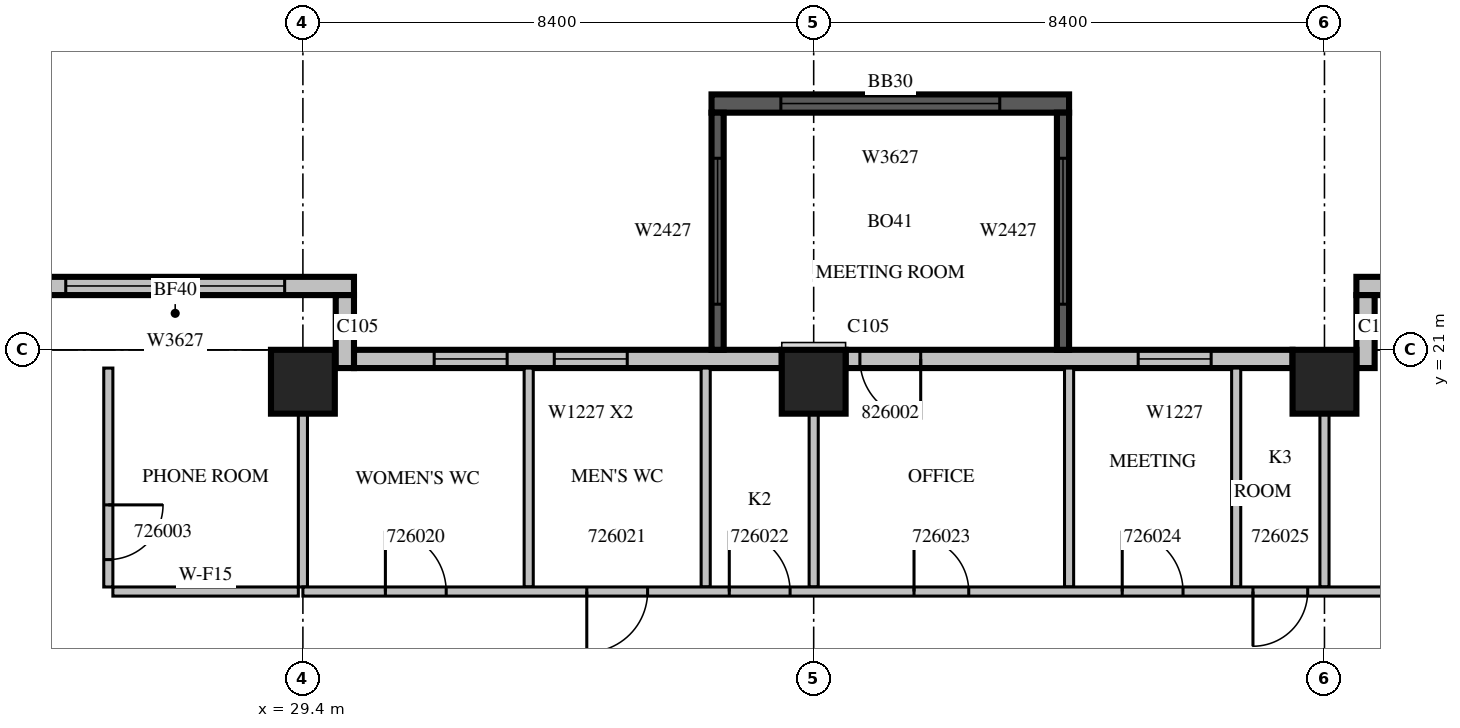
"""IFC4 building model, lengths in metres.
Left out: names, types, materials, properties, quantities, classifications, styles, units other than length and angle.
Written with IfcOpenShell. Run it as: python <this file> out.ifc"""

import sys

from ifc_helpers import new_model, si_unit, direction, frame, frame_2d, origin, origin_2d, place, context, subcontext, project, spatial, rectangle, extrude, source, transform, mapped, element, fill, save


model = new_model("IFC4")
c1 = context("Model", 3, precision=1e-05, world=origin(), true_north=direction((0.0, 1.0)))
c2 = subcontext(c1, "Body", "Model", "MODEL_VIEW")
j1 = project(units=[si_unit("LENGTHUNIT", "METRE"), si_unit("PLANEANGLEUNIT", "RADIAN")], contexts=[c1])
p1 = place(None, origin())
s1 = spatial("IfcSite", under=j1, at=p1, CompositionType="ELEMENT")
p2 = place(p1, origin())
s2 = spatial("IfcBuilding", under=s1, at=p2, CompositionType="ELEMENT")
p3 = place(p2, frame((0.0, 0.0, 120.3)))
s3 = spatial("IfcBuildingStorey", under=s2, at=p3, CompositionType="ELEMENT", Elevation=120.3)
m1 = source(origin(), c2, "Body", "SweptSolid", [
    extrude(rectangle(XDim=1.05, YDim=1.05, at=origin_2d()), origin(), (0.0, 0.0, 1.0), 4.2),
])
for number, where, z_axis, x_axis in (
    (1, (29.4, 20.475, 0.0), (0.0, 0.0, 1.0), (1.0, 0.0, 0.0)),
    (2, (37.8, 20.475, 0.0), (0.0, 0.0, 1.0), (1.0, 0.0, 0.0)),
    (3, (46.2, 20.475, 0.0), (0.0, 0.0, 1.0), (1.0, 0.0, 0.0)),
):
    element("IfcColumn", number, at=place(p3, frame(where, z_axis=z_axis, x_axis=x_axis)), inside=s3, PredefinedType="COLUMN", context=c2, shape_type="MappedRepresentation", body=[
        mapped(m1, transform((0.0, 0.0, 0.0), scale=1.0)),
    ])
m2 = source(origin(), c2, "Body", "SweptSolid", [
    extrude(rectangle(XDim=3.675, YDim=0.3, at=frame_2d((1.837, 0.0))), origin(), (0.0, 0.0, 1.0), 3.8),
])
p4 = place(p3, frame((50.4, 22.05, 0.0), z_axis=(0.0, 0.0, 1.0), x_axis=(-1.0, 0.0, 0.0)))
e4 = element("IfcWall", 4, at=p4, inside=s3, PredefinedType="STANDARD", context=c2, shape_type="MappedRepresentation", body=[
    mapped(m2, transform((0.0, 0.0, 0.0), scale=1.0)),
])
m3 = source(origin(), c2, "Body", "SweptSolid", [
    extrude(rectangle(XDim=2.4, YDim=2.7, at=frame_2d((1.2, 1.35))), frame((0.0, 0.16, 0.0), z_axis=(0.0, -1.0, 0.0), x_axis=(1.0, 0.0, 0.0)), (0.0, 0.0, 1.0), 0.32),
])
p5 = place(p4, frame((0.537, 0.0, 0.6)))
e5 = element("IfcOpeningElement", 5, at=p5, cuts=e4, PredefinedType="OPENING", context=c2, shape_type="MappedRepresentation", body=[
    mapped(m3, transform((0.0, 0.0, 0.0), scale=1.0)),
])
m4 = source(origin(), c2, "Body", "SweptSolid", [
    extrude(rectangle(XDim=1.2, YDim=0.3, at=frame_2d((0.6, 0.0))), origin(), (0.0, 0.0, 1.0), 3.8),
])
p6 = place(p3, frame((46.875, 20.7, 0.0), z_axis=(0.0, 0.0, 1.0), x_axis=(0.0, 1.0, 0.0)))
e6 = element("IfcWall", 6, at=p6, inside=s3, PredefinedType="STANDARD", context=c2, shape_type="MappedRepresentation", body=[
    mapped(m4, transform((0.0, 0.0, 0.0), scale=1.0)),
])
m5 = source(origin(), c2, "Body", "SweptSolid", [
    extrude(rectangle(XDim=7.35, YDim=0.3, at=frame_2d((3.675, 0.0))), origin(), (0.0, 0.0, 1.0), 3.8),
])
p7 = place(p3, frame((45.675, 20.85, 0.0), z_axis=(0.0, 0.0, 1.0), x_axis=(-1.0, 0.0, 0.0)))
e7 = element("IfcWall", 7, at=p7, inside=s3, PredefinedType="STANDARD", context=c2, shape_type="MappedRepresentation", body=[
    mapped(m5, transform((0.0, 0.0, 0.0), scale=1.0)),
])
m6 = source(origin(), c2, "Body", "SweptSolid", [
    extrude(rectangle(XDim=1.2, YDim=2.7, at=frame_2d((0.6, 1.35))), frame((0.0, 0.16, 0.0), z_axis=(0.0, -1.0, 0.0), x_axis=(1.0, 0.0, 0.0)), (0.0, 0.0, 1.0), 0.32),
])
p8 = place(p7, frame((1.339, 0.0, 0.6)))
e8 = element("IfcOpeningElement", 8, at=p8, cuts=e7, PredefinedType="OPENING", context=c2, shape_type="MappedRepresentation", body=[
    mapped(m6, transform((0.0, 0.0, 0.0), scale=1.0)),
])
m7 = source(origin(), c2, "Body", "SweptSolid", [
    extrude(rectangle(XDim=1.0, YDim=2.1, at=frame_2d((0.5, 1.05))), frame((0.0, 0.16, 0.0), z_axis=(0.0, -1.0, 0.0), x_axis=(1.0, 0.0, 0.0)), (0.0, 0.0, 1.0), 0.32),
])
p9 = place(p7, frame((6.115, 0.0, 0.0)))
e9 = element("IfcOpeningElement", 9, at=p9, cuts=e7, PredefinedType="OPENING", context=c2, shape_type="MappedRepresentation", body=[
    mapped(m7, transform((0.0, 0.0, 0.0), scale=1.0)),
])
p10 = place(p3, frame((37.275, 20.85, 0.0), z_axis=(0.0, 0.0, 1.0), x_axis=(-1.0, 0.0, 0.0)))
e10 = element("IfcWall", 10, at=p10, inside=s3, PredefinedType="STANDARD", context=c2, shape_type="SweptSolid", body=[
    extrude(rectangle(XDim=7.035, YDim=0.3, at=frame_2d((3.518, 0.0))), origin(), (0.0, 0.0, 1.0), 3.8),
])
p11 = place(p10, frame((2.541, 0.0, 0.6)))
e11 = element("IfcOpeningElement", 11, at=p11, cuts=e10, PredefinedType="OPENING", context=c2, shape_type="MappedRepresentation", body=[
    mapped(m6, transform((0.0, 0.0, 0.0), scale=1.0)),
])
p12 = place(p10, frame((4.516, 0.0, 0.6)))
e12 = element("IfcOpeningElement", 12, at=p12, cuts=e10, PredefinedType="OPENING", context=c2, shape_type="MappedRepresentation", body=[
    mapped(m6, transform((0.0, 0.0, 0.0), scale=1.0)),
])
m8 = source(origin(), c2, "Body", "SweptSolid", [
    extrude(rectangle(XDim=5.88, YDim=0.3, at=frame_2d((2.94, 0.0))), origin(), (0.0, 0.0, 1.0), 3.8),
])
p13 = place(p3, frame((30.24, 22.05, 0.0), z_axis=(0.0, 0.0, 1.0), x_axis=(-1.0, 0.0, 0.0)))
e13 = element("IfcWall", 13, at=p13, inside=s3, PredefinedType="STANDARD", context=c2, shape_type="MappedRepresentation", body=[
    mapped(m8, transform((0.0, 0.0, 0.0), scale=1.0)),
])
m9 = source(origin(), c2, "Body", "SweptSolid", [
    extrude(rectangle(XDim=3.6, YDim=2.7, at=frame_2d((1.8, 1.35))), frame((0.0, 0.16, 0.0), z_axis=(0.0, -1.0, 0.0), x_axis=(1.0, 0.0, 0.0)), (0.0, 0.0, 1.0), 0.32),
])
p14 = place(p13, frame((1.14, 0.0, 0.6)))
e14 = element("IfcOpeningElement", 14, at=p14, cuts=e13, PredefinedType="OPENING", context=c2, shape_type="MappedRepresentation", body=[
    mapped(m9, transform((0.0, 0.0, 0.0), scale=1.0)),
])
p15 = place(p3, frame((30.09, 20.7, 0.0), z_axis=(0.0, 0.0, 1.0), x_axis=(0.0, 1.0, 0.0)))
e15 = element("IfcWall", 15, at=p15, inside=s3, PredefinedType="STANDARD", context=c2, shape_type="MappedRepresentation", body=[
    mapped(m4, transform((0.0, 0.0, 0.0), scale=1.0)),
])
m10 = source(origin(), c2, "Body", "SweptSolid", [
    extrude(rectangle(XDim=5.88, YDim=0.3, at=frame_2d((2.94, 0.0))), origin(), (0.0, 0.0, 1.0), 3.79),
])
p16 = place(p3, frame((42.0, 25.05, 0.0), z_axis=(0.0, 0.0, 1.0), x_axis=(-1.0, 0.0, 0.0)))
e16 = element("IfcWall", 16, at=p16, inside=s3, PredefinedType="SOLIDWALL", context=c2, shape_type="MappedRepresentation", body=[
    mapped(m10, transform((0.0, 0.0, 0.0), scale=1.0)),
])
p17 = place(p16, frame((1.14, 0.0, 0.6)))
e17 = element("IfcOpeningElement", 17, at=p17, cuts=e16, PredefinedType="OPENING", context=c2, shape_type="MappedRepresentation", body=[
    mapped(m9, transform((0.0, 0.0, 0.0), scale=1.0)),
])
m11 = source(origin(), c2, "Body", "SweptSolid", [
    extrude(rectangle(XDim=3.9, YDim=0.2, at=frame_2d((1.95, 0.0))), origin(), (0.0, 0.0, 1.0), 3.79),
])
p18 = place(p3, frame((41.9, 21.0, 0.0), z_axis=(0.0, 0.0, 1.0), x_axis=(0.0, 1.0, 0.0)))
e18 = element("IfcWall", 18, at=p18, inside=s3, PredefinedType="SOLIDWALL", context=c2, shape_type="MappedRepresentation", body=[
    mapped(m11, transform((0.0, 0.0, 0.0), scale=1.0)),
])
m12 = source(origin(), c2, "Body", "SweptSolid", [
    extrude(rectangle(XDim=2.4, YDim=2.7, at=frame_2d((1.2, 1.35))), frame((0.0, 0.11, 0.0), z_axis=(0.0, -1.0, 0.0), x_axis=(1.0, 0.0, 0.0)), (0.0, 0.0, 1.0), 0.22),
])
p19 = place(p18, frame((0.75, 0.0, 0.6)))
e19 = element("IfcOpeningElement", 19, at=p19, cuts=e18, PredefinedType="OPENING", context=c2, shape_type="MappedRepresentation", body=[
    mapped(m12, transform((0.0, 0.0, 0.0), scale=1.0)),
])
p20 = place(p3, frame((36.22, 21.0, 0.0), z_axis=(0.0, 0.0, 1.0), x_axis=(0.0, 1.0, 0.0)))
e20 = element("IfcWall", 20, at=p20, inside=s3, PredefinedType="SOLIDWALL", context=c2, shape_type="MappedRepresentation", body=[
    mapped(m11, transform((0.0, 0.0, 0.0), scale=1.0)),
])
p21 = place(p20, frame((0.75, 0.0, 0.6)))
e21 = element("IfcOpeningElement", 21, at=p21, cuts=e20, PredefinedType="OPENING", context=c2, shape_type="MappedRepresentation", body=[
    mapped(m12, transform((0.0, 0.0, 0.0), scale=1.0)),
])
m13 = source(origin(), c2, "Body", "SweptSolid", [
    extrude(rectangle(XDim=3.6, YDim=0.15, at=frame_2d((1.8, 0.0))), origin(), (0.0, 0.0, 1.0), 3.8),
])
p22 = place(p3, frame((26.2, 20.7, 0.0), z_axis=(0.0, 0.0, 1.0), x_axis=(0.0, -1.0, 0.0)))
e22 = element("IfcWall", 22, at=p22, inside=s3, PredefinedType="PARTITIONING", context=c2, shape_type="MappedRepresentation", body=[
    mapped(m13, transform((0.0, 0.0, 0.0), scale=1.0)),
])
m14 = source(origin(), c2, "Body", "SweptSolid", [
    extrude(rectangle(XDim=0.9, YDim=2.1, at=frame_2d((0.45, 1.05))), frame((0.0, 0.085, 0.0), z_axis=(0.0, -1.0, 0.0), x_axis=(1.0, 0.0, 0.0)), (0.0, 0.0, 1.0), 0.17),
])
p23 = place(p22, frame((2.25, 0.0, 0.0)))
e23 = element("IfcOpeningElement", 23, at=p23, cuts=e22, PredefinedType="OPENING", context=c2, shape_type="MappedRepresentation", body=[
    mapped(m14, transform((0.0, 0.0, 0.0), scale=1.0)),
])
m15 = source(origin(), c2, "Body", "SweptSolid", [
    extrude(rectangle(XDim=3.05, YDim=0.15, at=frame_2d((1.525, 0.0))), origin(), (0.0, 0.0, 1.0), 3.8),
])
p24 = place(p3, frame((26.275, 17.025, 0.0), z_axis=(0.0, 0.0, 1.0), x_axis=(1.0, 0.0, 0.0)))
e24 = element("IfcWall", 24, at=p24, inside=s3, PredefinedType="PARTITIONING", context=c2, shape_type="MappedRepresentation", body=[
    mapped(m15, transform((0.0, 0.0, 0.0), scale=1.0)),
])
m16 = source(origin(), c2, "Body", "SweptSolid", [
    extrude(rectangle(XDim=2.851, YDim=0.15, at=frame_2d((1.425, 0.0))), origin(), (0.0, 0.0, 1.0), 3.8),
])
p25 = place(p3, frame((29.4, 17.1, 0.0), z_axis=(0.0, 0.0, 1.0), x_axis=(0.0, 1.0, 0.0)))
e25 = element("IfcWall", 25, at=p25, inside=s3, PredefinedType="PARTITIONING", context=c2, shape_type="MappedRepresentation", body=[
    mapped(m16, transform((0.0, 0.0, 0.0), scale=1.0)),
])
for number, where, z_axis, x_axis in (
    (26, (33.113, 20.7, 0.0), (0.0, 0.0, 1.0), (0.0, -1.0, 0.0)),
    (27, (36.024, 20.7, 0.0), (0.0, 0.0, 1.0), (0.0, -1.0, 0.0)),
    (28, (44.748, 20.7, 0.0), (0.0, 0.0, 1.0), (0.0, -1.0, 0.0)),
):
    element("IfcWall", number, at=place(p3, frame(where, z_axis=z_axis, x_axis=x_axis)), inside=s3, PredefinedType="PARTITIONING", context=c2, shape_type="MappedRepresentation", body=[
        mapped(m13, transform((0.0, 0.0, 0.0), scale=1.0)),
    ])
p26 = place(p3, frame((37.8, 17.1, 0.0), z_axis=(0.0, 0.0, 1.0), x_axis=(0.0, 1.0, 0.0)))
e29 = element("IfcWall", 29, at=p26, inside=s3, PredefinedType="PARTITIONING", context=c2, shape_type="MappedRepresentation", body=[
    mapped(m16, transform((0.0, 0.0, 0.0), scale=1.0)),
])
p27 = place(p3, frame((42.0, 17.1, 0.0), z_axis=(0.0, 0.0, 1.0), x_axis=(0.0, 1.0, 0.0)))
e30 = element("IfcWall", 30, at=p27, inside=s3, PredefinedType="PARTITIONING", context=c2, shape_type="MappedRepresentation", body=[
    mapped(m13, transform((0.0, 0.0, 0.0), scale=1.0)),
])
p28 = place(p3, frame((46.2, 17.1, 0.0), z_axis=(0.0, 0.0, 1.0), x_axis=(0.0, 1.0, 0.0)))
e31 = element("IfcWall", 31, at=p28, inside=s3, PredefinedType="PARTITIONING", context=c2, shape_type="MappedRepresentation", body=[
    mapped(m16, transform((0.0, 0.0, 0.0), scale=1.0)),
])
m17 = source(origin(), c2, "Body", "SweptSolid", [
    extrude(rectangle(XDim=37.5, YDim=0.15, at=frame_2d((18.75, 0.0))), origin(), (0.0, 0.0, 1.0), 3.8),
])
p29 = place(p3, frame((29.4, 17.025, 0.0), z_axis=(0.0, 0.0, 1.0), x_axis=(1.0, 0.0, 0.0)))
e32 = element("IfcWall", 32, at=p29, inside=s3, PredefinedType="PARTITIONING", context=c2, shape_type="MappedRepresentation", body=[
    mapped(m17, transform((0.0, 0.0, 0.0), scale=1.0)),
])
m18 = source(origin(), c2, "Body", "SweptSolid", [
    extrude(rectangle(XDim=1.0, YDim=2.1, at=frame_2d((0.5, 1.05))), frame((0.0, 0.085, 0.0), z_axis=(0.0, -1.0, 0.0), x_axis=(1.0, 0.0, 0.0)), (0.0, 0.0, 1.0), 0.17),
])
p30 = place(p29, frame((1.357, 0.0, 0.0)))
e33 = element("IfcOpeningElement", 33, at=p30, cuts=e32, PredefinedType="OPENING", context=c2, shape_type="MappedRepresentation", body=[
    mapped(m18, transform((0.0, 0.0, 0.0), scale=1.0)),
])
p31 = place(p29, frame((4.669, 0.0, 0.0)))
e34 = element("IfcOpeningElement", 34, at=p31, cuts=e32, PredefinedType="OPENING", context=c2, shape_type="MappedRepresentation", body=[
    mapped(m18, transform((0.0, 0.0, 0.0), scale=1.0)),
])
p32 = place(p29, frame((7.012, 0.0, 0.0)))
e35 = element("IfcOpeningElement", 35, at=p32, cuts=e32, PredefinedType="OPENING", context=c2, shape_type="MappedRepresentation", body=[
    mapped(m18, transform((0.0, 0.0, 0.0), scale=1.0)),
])
p33 = place(p29, frame((10.05, 0.0, 0.0)))
e36 = element("IfcOpeningElement", 36, at=p33, cuts=e32, PredefinedType="OPENING", context=c2, shape_type="MappedRepresentation", body=[
    mapped(m14, transform((0.0, 0.0, 0.0), scale=1.0)),
])
p34 = place(p29, frame((13.474, 0.0, 0.0)))
e37 = element("IfcOpeningElement", 37, at=p34, cuts=e32, PredefinedType="OPENING", context=c2, shape_type="MappedRepresentation", body=[
    mapped(m18, transform((0.0, 0.0, 0.0), scale=1.0)),
])
p35 = place(p29, frame((15.624, 0.0, 0.0)))
e38 = element("IfcOpeningElement", 38, at=p35, cuts=e32, PredefinedType="OPENING", context=c2, shape_type="MappedRepresentation", body=[
    mapped(m14, transform((0.0, 0.0, 0.0), scale=1.0)),
])
m19 = source(origin(), c2, "Body", "SweptSolid", [
    extrude(rectangle(XDim=1.2, YDim=2.1, at=frame_2d((0.6, 1.05))), frame((0.0, 0.085, 0.0), z_axis=(0.0, -1.0, 0.0), x_axis=(1.0, 0.0, 0.0)), (0.0, 0.0, 1.0), 0.17),
])
p36 = place(p29, frame((19.14, 0.0, 0.0)))
e39 = element("IfcOpeningElement", 39, at=p36, cuts=e32, PredefinedType="OPENING", context=c2, shape_type="MappedRepresentation", body=[
    mapped(m19, transform((0.0, 0.0, 0.0), scale=1.0)),
])
p37 = place(p29, frame((25.02, 0.0, 0.0)))
e40 = element("IfcOpeningElement", 40, at=p37, cuts=e32, PredefinedType="OPENING", context=c2, shape_type="MappedRepresentation", body=[
    mapped(m19, transform((0.0, 0.0, 0.0), scale=1.0)),
])
p38 = place(p29, frame((30.052, 0.0, 0.0)))
e41 = element("IfcOpeningElement", 41, at=p38, cuts=e32, PredefinedType="OPENING", context=c2, shape_type="MappedRepresentation", body=[
    mapped(m18, transform((0.0, 0.0, 0.0), scale=1.0)),
])
p39 = place(p29, frame((33.608, 0.0, 0.0)))
e42 = element("IfcOpeningElement", 42, at=p39, cuts=e32, PredefinedType="OPENING", context=c2, shape_type="MappedRepresentation", body=[
    mapped(m18, transform((0.0, 0.0, 0.0), scale=1.0)),
])
p40 = place(p29, frame((36.124, 0.0, 0.0)))
e43 = element("IfcOpeningElement", 43, at=p40, cuts=e32, PredefinedType="OPENING", context=c2, shape_type="MappedRepresentation", body=[
    mapped(m18, transform((0.0, 0.0, 0.0), scale=1.0)),
])
m20 = source(origin(), c2, "Body", "SweptSolid", [
    extrude(rectangle(XDim=1.2, YDim=2.7, at=frame_2d((0.6, 1.35))), frame((0.0, 0.03, 0.0), z_axis=(0.0, -1.0, 0.0), x_axis=(1.0, 0.0, 0.0)), (0.0, 0.0, 1.0), 0.06),
])
p41 = place(p8, origin())
e44 = element("IfcWindow", 44, at=p41, inside=s3, PartitioningType="SINGLE_PANEL", PredefinedType="WINDOW", context=c2, shape_type="MappedRepresentation", body=[
    mapped(m20, transform((0.0, 0.0, 0.0), scale=1.0)),
])
fill(e8, e44)
p42 = place(p11, origin())
e45 = element("IfcWindow", 45, at=p42, inside=s3, PartitioningType="SINGLE_PANEL", PredefinedType="WINDOW", context=c2, shape_type="MappedRepresentation", body=[
    mapped(m20, transform((0.0, 0.0, 0.0), scale=1.0)),
])
fill(e11, e45)
p43 = place(p12, origin())
e46 = element("IfcWindow", 46, at=p43, inside=s3, PartitioningType="SINGLE_PANEL", PredefinedType="WINDOW", context=c2, shape_type="MappedRepresentation", body=[
    mapped(m20, transform((0.0, 0.0, 0.0), scale=1.0)),
])
fill(e12, e46)
m21 = source(origin(), c2, "Body", "SweptSolid", [
    extrude(rectangle(XDim=3.6, YDim=2.7, at=frame_2d((1.8, 1.35))), frame((0.0, 0.03, 0.0), z_axis=(0.0, -1.0, 0.0), x_axis=(1.0, 0.0, 0.0)), (0.0, 0.0, 1.0), 0.06),
])
p44 = place(p14, origin())
e47 = element("IfcWindow", 47, at=p44, inside=s3, PartitioningType="SINGLE_PANEL", PredefinedType="WINDOW", context=c2, shape_type="MappedRepresentation", body=[
    mapped(m21, transform((0.0, 0.0, 0.0), scale=1.0)),
])
fill(e14, e47)
p45 = place(p17, origin())
e48 = element("IfcWindow", 48, at=p45, inside=s3, PartitioningType="SINGLE_PANEL", PredefinedType="WINDOW", context=c2, shape_type="MappedRepresentation", body=[
    mapped(m21, transform((0.0, 0.0, 0.0), scale=1.0)),
])
fill(e17, e48)
m22 = source(origin(), c2, "Body", "SweptSolid", [
    extrude(rectangle(XDim=2.4, YDim=2.7, at=frame_2d((1.2, 1.35))), frame((0.0, 0.03, 0.0), z_axis=(0.0, -1.0, 0.0), x_axis=(1.0, 0.0, 0.0)), (0.0, 0.0, 1.0), 0.06),
])
p46 = place(p19, origin())
e49 = element("IfcWindow", 49, at=p46, inside=s3, PartitioningType="SINGLE_PANEL", PredefinedType="WINDOW", context=c2, shape_type="MappedRepresentation", body=[
    mapped(m22, transform((0.0, 0.0, 0.0), scale=1.0)),
])
fill(e19, e49)
p47 = place(p21, origin())
e50 = element("IfcWindow", 50, at=p47, inside=s3, PartitioningType="SINGLE_PANEL", PredefinedType="WINDOW", context=c2, shape_type="MappedRepresentation", body=[
    mapped(m22, transform((0.0, 0.0, 0.0), scale=1.0)),
])
fill(e21, e50)
m23 = source(origin(), c2, "Body", "SweptSolid", [
    extrude(rectangle(XDim=0.9, YDim=2.1, at=frame_2d((0.45, 1.05))), frame((0.0, 0.025, 0.0), z_axis=(0.0, -1.0, 0.0), x_axis=(1.0, 0.0, 0.0)), (0.0, 0.0, 1.0), 0.05),
])
p48 = place(p23, origin())
e51 = element("IfcDoor", 51, at=p48, inside=s3, OperationType="SINGLE_SWING_LEFT", PredefinedType="DOOR", context=c2, shape_type="MappedRepresentation", body=[
    mapped(m23, transform((0.0, 0.0, 0.0), scale=1.0)),
])
fill(e23, e51)
m24 = source(origin(), c2, "Body", "SweptSolid", [
    extrude(rectangle(XDim=1.0, YDim=2.1, at=frame_2d((0.5, 1.05))), frame((0.0, 0.025, 0.0), z_axis=(0.0, -1.0, 0.0), x_axis=(1.0, 0.0, 0.0)), (0.0, 0.0, 1.0), 0.05),
])
p49 = place(p30, origin())
e52 = element("IfcDoor", 52, at=p49, inside=s3, OperationType="SINGLE_SWING_LEFT", PredefinedType="DOOR", context=c2, shape_type="MappedRepresentation", body=[
    mapped(m24, transform((0.0, 0.0, 0.0), scale=1.0)),
])
fill(e33, e52)
p50 = place(p31, origin())
e53 = element("IfcDoor", 53, at=p50, inside=s3, OperationType="SINGLE_SWING_RIGHT", PredefinedType="DOOR", context=c2, shape_type="MappedRepresentation", body=[
    mapped(m24, transform((0.0, 0.0, 0.0), scale=1.0)),
])
fill(e34, e53)
p51 = place(p32, origin())
e54 = element("IfcDoor", 54, at=p51, inside=s3, OperationType="SINGLE_SWING_LEFT", PredefinedType="DOOR", context=c2, shape_type="MappedRepresentation", body=[
    mapped(m24, transform((0.0, 0.0, 0.0), scale=1.0)),
])
fill(e35, e54)
p52 = place(p33, origin())
e55 = element("IfcDoor", 55, at=p52, inside=s3, OperationType="SINGLE_SWING_LEFT", PredefinedType="DOOR", context=c2, shape_type="MappedRepresentation", body=[
    mapped(m23, transform((0.0, 0.0, 0.0), scale=1.0)),
])
fill(e36, e55)
p53 = place(p34, origin())
e56 = element("IfcDoor", 56, at=p53, inside=s3, OperationType="SINGLE_SWING_LEFT", PredefinedType="DOOR", context=c2, shape_type="MappedRepresentation", body=[
    mapped(m24, transform((0.0, 0.0, 0.0), scale=1.0)),
])
fill(e37, e56)
p54 = place(p35, origin())
e57 = element("IfcDoor", 57, at=p54, inside=s3, OperationType="SINGLE_SWING_RIGHT", PredefinedType="DOOR", context=c2, shape_type="MappedRepresentation", body=[
    mapped(m23, transform((0.0, 0.0, 0.0), scale=1.0)),
])
fill(e38, e57)
p55 = place(p9, origin())
e58 = element("IfcDoor", 58, at=p55, inside=s3, OperationType="SINGLE_SWING_LEFT", PredefinedType="DOOR", context=c2, shape_type="MappedRepresentation", body=[
    mapped(m24, transform((0.0, 0.0, 0.0), scale=1.0)),
])
fill(e9, e58)
save(model, sys.argv[1])
